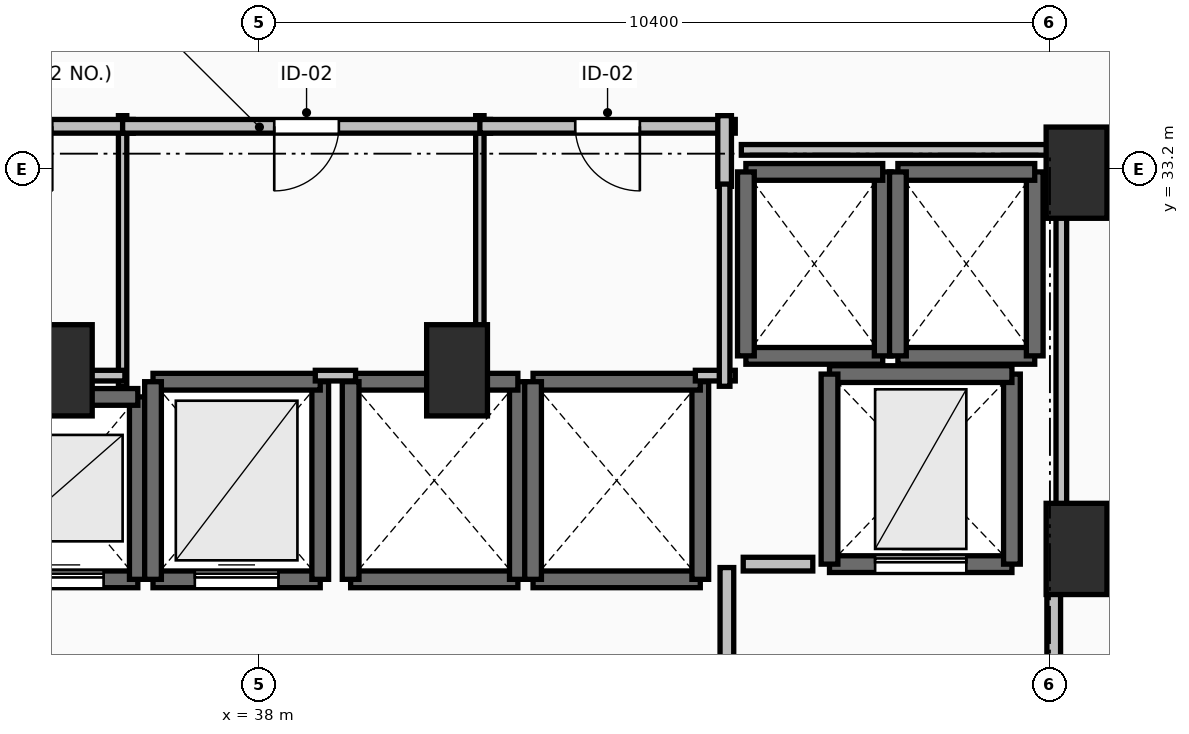
"""IFC4 building model, lengths in metres.
Left out: names, types, materials, properties, quantities, classifications, styles, units other than length and angle.
Written with IfcOpenShell. Run it as: python <this file> out.ifc"""

import sys

from ifc_helpers import new_model, si_unit, direction, frame, frame_2d, origin, origin_2d, place, context, subcontext, project, spatial, rectangle, extrude, element, fill, save


model = new_model("IFC4")
c1 = context("Model", 3, precision=1e-05, world=origin(), true_north=direction((0.0, 1.0)))
c2 = subcontext(c1, "Body", "Model", "MODEL_VIEW")
j1 = project(units=[si_unit("LENGTHUNIT", "METRE"), si_unit("PLANEANGLEUNIT", "RADIAN")], contexts=[c1])
p1 = place(None, origin())
s1 = spatial("IfcSite", under=j1, at=p1, CompositionType="ELEMENT")
p2 = place(p1, origin())
s2 = spatial("IfcBuilding", under=s1, at=p2, CompositionType="ELEMENT")
p3 = place(p2, frame((0.0, 0.0, 55.5)))
s3 = spatial("IfcBuildingStorey", under=s2, at=p3, CompositionType="ELEMENT", Elevation=55.5)
for number, where, z_axis, x_axis in (
    (1, (48.75, 33.15, 0.0), (0.0, 0.0, 1.0), (1.0, 0.0, 0.0)),
    (2, (48.75, 28.2, 0.0), (0.0, 0.0, 1.0), (1.0, 0.0, 0.0)),
    (3, (35.4, 30.55, 0.0), (0.0, 0.0, 1.0), (1.0, 0.0, 0.0)),
    (4, (40.6, 30.55, 0.0), (0.0, 0.0, 1.0), (1.0, 0.0, 0.0)),
):
    element("IfcColumn", number, at=place(p3, frame(where, z_axis=z_axis, x_axis=x_axis)), inside=s3, PredefinedType="PILASTER", context=c2, shape_type="SweptSolid", body=[
        extrude(rectangle(XDim=0.8, YDim=1.2, at=origin_2d()), origin(), (0.0, 0.0, 1.0), 3.5),
    ])
p4 = place(p3, frame((34.4, 27.8, 0.0), z_axis=(0.0, 0.0, 1.0), x_axis=(1.0, 0.0, 0.0)))
e5 = element("IfcWall", 5, at=p4, inside=s3, PredefinedType="SOLIDWALL", context=c2, shape_type="SweptSolid", body=[
    extrude(rectangle(XDim=2.0, YDim=0.22, at=frame_2d((1.0, 0.0))), origin(), (0.0, 0.0, 1.0), 3.24),
])
p5 = place(p4, frame((0.45, 0.0, 0.0)))
e6 = element("IfcOpeningElement", 6, at=p5, cuts=e5, PredefinedType="OPENING", context=c2, shape_type="SweptSolid", body=[
    extrude(rectangle(XDim=1.1, YDim=2.2, at=frame_2d((0.55, 1.1))), frame((0.0, 0.125, 0.0), z_axis=(0.0, -1.0, 0.0), x_axis=(1.0, 0.0, 0.0)), (0.0, 0.0, 1.0), 0.25),
])
p6 = place(p3, frame((36.4, 27.8, 0.0), z_axis=(0.0, 0.0, 1.0), x_axis=(0.0, 1.0, 0.0)))
e7 = element("IfcWall", 7, at=p6, inside=s3, PredefinedType="SOLIDWALL", context=c2, shape_type="SweptSolid", body=[
    extrude(rectangle(XDim=2.4, YDim=0.22, at=frame_2d((1.2, 0.0))), origin(), (0.0, 0.0, 1.0), 3.24),
])
p7 = place(p3, frame((36.4, 30.2, 0.0), z_axis=(0.0, 0.0, 1.0), x_axis=(-1.0, 0.0, 0.0)))
e8 = element("IfcWall", 8, at=p7, inside=s3, PredefinedType="SOLIDWALL", context=c2, shape_type="SweptSolid", body=[
    extrude(rectangle(XDim=2.0, YDim=0.22, at=frame_2d((1.0, 0.0))), origin(), (0.0, 0.0, 1.0), 3.24),
])
p8 = place(p3, frame((36.6, 27.8, 0.0), z_axis=(0.0, 0.0, 1.0), x_axis=(1.0, 0.0, 0.0)))
e9 = element("IfcWall", 9, at=p8, inside=s3, PredefinedType="SOLIDWALL", context=c2, shape_type="SweptSolid", body=[
    extrude(rectangle(XDim=2.2, YDim=0.22, at=frame_2d((1.1, 0.0))), origin(), (0.0, 0.0, 1.0), 3.24),
])
p9 = place(p8, frame((0.55, 0.0, 0.0)))
e10 = element("IfcOpeningElement", 10, at=p9, cuts=e9, PredefinedType="OPENING", context=c2, shape_type="SweptSolid", body=[
    extrude(rectangle(XDim=1.1, YDim=2.2, at=frame_2d((0.55, 1.1))), frame((0.0, 0.125, 0.0), z_axis=(0.0, -1.0, 0.0), x_axis=(1.0, 0.0, 0.0)), (0.0, 0.0, 1.0), 0.25),
])
p10 = place(p3, frame((38.8, 27.8, 0.0), z_axis=(0.0, 0.0, 1.0), x_axis=(0.0, 1.0, 0.0)))
e11 = element("IfcWall", 11, at=p10, inside=s3, PredefinedType="SOLIDWALL", context=c2, shape_type="SweptSolid", body=[
    extrude(rectangle(XDim=2.6, YDim=0.22, at=frame_2d((1.3, 0.0))), origin(), (0.0, 0.0, 1.0), 3.24),
])
p11 = place(p3, frame((38.8, 30.4, 0.0), z_axis=(0.0, 0.0, 1.0), x_axis=(-1.0, 0.0, 0.0)))
e12 = element("IfcWall", 12, at=p11, inside=s3, PredefinedType="SOLIDWALL", context=c2, shape_type="SweptSolid", body=[
    extrude(rectangle(XDim=2.2, YDim=0.22, at=frame_2d((1.1, 0.0))), origin(), (0.0, 0.0, 1.0), 3.24),
])
p12 = place(p3, frame((36.6, 30.4, 0.0), z_axis=(0.0, 0.0, 1.0), x_axis=(0.0, -1.0, 0.0)))
e13 = element("IfcWall", 13, at=p12, inside=s3, PredefinedType="SOLIDWALL", context=c2, shape_type="SweptSolid", body=[
    extrude(rectangle(XDim=2.6, YDim=0.22, at=frame_2d((1.3, 0.0))), origin(), (0.0, 0.0, 1.0), 3.24),
])
p13 = place(p3, frame((39.2, 27.8, 0.0), z_axis=(0.0, 0.0, 1.0), x_axis=(1.0, 0.0, 0.0)))
e14 = element("IfcWall", 14, at=p13, inside=s3, PredefinedType="SOLIDWALL", context=c2, shape_type="SweptSolid", body=[
    extrude(rectangle(XDim=2.2, YDim=0.22, at=frame_2d((1.1, 0.0))), origin(), (0.0, 0.0, 1.0), 3.24),
])
p14 = place(p3, frame((41.4, 27.8, 0.0), z_axis=(0.0, 0.0, 1.0), x_axis=(0.0, 1.0, 0.0)))
e15 = element("IfcWall", 15, at=p14, inside=s3, PredefinedType="SOLIDWALL", context=c2, shape_type="SweptSolid", body=[
    extrude(rectangle(XDim=2.6, YDim=0.22, at=frame_2d((1.3, 0.0))), origin(), (0.0, 0.0, 1.0), 3.24),
])
p15 = place(p3, frame((41.4, 30.4, 0.0), z_axis=(0.0, 0.0, 1.0), x_axis=(-1.0, 0.0, 0.0)))
e16 = element("IfcWall", 16, at=p15, inside=s3, PredefinedType="SOLIDWALL", context=c2, shape_type="SweptSolid", body=[
    extrude(rectangle(XDim=2.2, YDim=0.22, at=frame_2d((1.1, 0.0))), origin(), (0.0, 0.0, 1.0), 3.24),
])
p16 = place(p3, frame((39.2, 30.4, 0.0), z_axis=(0.0, 0.0, 1.0), x_axis=(0.0, -1.0, 0.0)))
e17 = element("IfcWall", 17, at=p16, inside=s3, PredefinedType="SOLIDWALL", context=c2, shape_type="SweptSolid", body=[
    extrude(rectangle(XDim=2.6, YDim=0.22, at=frame_2d((1.3, 0.0))), origin(), (0.0, 0.0, 1.0), 3.24),
])
p17 = place(p3, frame((41.6, 27.8, 0.0), z_axis=(0.0, 0.0, 1.0), x_axis=(1.0, 0.0, 0.0)))
e18 = element("IfcWall", 18, at=p17, inside=s3, PredefinedType="SOLIDWALL", context=c2, shape_type="SweptSolid", body=[
    extrude(rectangle(XDim=2.2, YDim=0.22, at=frame_2d((1.1, 0.0))), origin(), (0.0, 0.0, 1.0), 3.24),
])
p18 = place(p3, frame((43.8, 27.8, 0.0), z_axis=(0.0, 0.0, 1.0), x_axis=(0.0, 1.0, 0.0)))
e19 = element("IfcWall", 19, at=p18, inside=s3, PredefinedType="SOLIDWALL", context=c2, shape_type="SweptSolid", body=[
    extrude(rectangle(XDim=2.6, YDim=0.22, at=frame_2d((1.3, 0.0))), origin(), (0.0, 0.0, 1.0), 3.24),
])
p19 = place(p3, frame((43.8, 30.4, 0.0), z_axis=(0.0, 0.0, 1.0), x_axis=(-1.0, 0.0, 0.0)))
e20 = element("IfcWall", 20, at=p19, inside=s3, PredefinedType="SOLIDWALL", context=c2, shape_type="SweptSolid", body=[
    extrude(rectangle(XDim=2.2, YDim=0.22, at=frame_2d((1.1, 0.0))), origin(), (0.0, 0.0, 1.0), 3.24),
])
p20 = place(p3, frame((41.6, 30.4, 0.0), z_axis=(0.0, 0.0, 1.0), x_axis=(0.0, -1.0, 0.0)))
e21 = element("IfcWall", 21, at=p20, inside=s3, PredefinedType="SOLIDWALL", context=c2, shape_type="SweptSolid", body=[
    extrude(rectangle(XDim=2.6, YDim=0.22, at=frame_2d((1.3, 0.0))), origin(), (0.0, 0.0, 1.0), 3.24),
])
p21 = place(p3, frame((44.4, 30.74, 0.0), z_axis=(0.0, 0.0, 1.0), x_axis=(1.0, 0.0, 0.0)))
e22 = element("IfcWall", 22, at=p21, inside=s3, PredefinedType="SOLIDWALL", context=c2, shape_type="SweptSolid", body=[
    extrude(rectangle(XDim=1.8, YDim=0.22, at=frame_2d((0.9, 0.0))), origin(), (0.0, 0.0, 1.0), 3.24),
])
p22 = place(p3, frame((46.2, 30.74, 0.0), z_axis=(0.0, 0.0, 1.0), x_axis=(0.0, 1.0, 0.0)))
e23 = element("IfcWall", 23, at=p22, inside=s3, PredefinedType="SOLIDWALL", context=c2, shape_type="SweptSolid", body=[
    extrude(rectangle(XDim=2.42, YDim=0.22, at=frame_2d((1.21, 0.0))), origin(), (0.0, 0.0, 1.0), 3.24),
])
p23 = place(p3, frame((46.2, 33.16, 0.0), z_axis=(0.0, 0.0, 1.0), x_axis=(-1.0, 0.0, 0.0)))
e24 = element("IfcWall", 24, at=p23, inside=s3, PredefinedType="SOLIDWALL", context=c2, shape_type="SweptSolid", body=[
    extrude(rectangle(XDim=1.8, YDim=0.22, at=frame_2d((0.9, 0.0))), origin(), (0.0, 0.0, 1.0), 3.24),
])
p24 = place(p3, frame((44.4, 33.16, 0.0), z_axis=(0.0, 0.0, 1.0), x_axis=(0.0, -1.0, 0.0)))
e25 = element("IfcWall", 25, at=p24, inside=s3, PredefinedType="SOLIDWALL", context=c2, shape_type="SweptSolid", body=[
    extrude(rectangle(XDim=2.42, YDim=0.22, at=frame_2d((1.21, 0.0))), origin(), (0.0, 0.0, 1.0), 3.24),
])
p25 = place(p3, frame((46.4, 30.74, 0.0), z_axis=(0.0, 0.0, 1.0), x_axis=(1.0, 0.0, 0.0)))
e26 = element("IfcWall", 26, at=p25, inside=s3, PredefinedType="SOLIDWALL", context=c2, shape_type="SweptSolid", body=[
    extrude(rectangle(XDim=1.8, YDim=0.22, at=frame_2d((0.9, 0.0))), origin(), (0.0, 0.0, 1.0), 3.24),
])
p26 = place(p3, frame((48.2, 30.74, 0.0), z_axis=(0.0, 0.0, 1.0), x_axis=(0.0, 1.0, 0.0)))
e27 = element("IfcWall", 27, at=p26, inside=s3, PredefinedType="SOLIDWALL", context=c2, shape_type="SweptSolid", body=[
    extrude(rectangle(XDim=2.42, YDim=0.22, at=frame_2d((1.21, 0.0))), origin(), (0.0, 0.0, 1.0), 3.24),
])
p27 = place(p3, frame((48.2, 33.16, 0.0), z_axis=(0.0, 0.0, 1.0), x_axis=(-1.0, 0.0, 0.0)))
e28 = element("IfcWall", 28, at=p27, inside=s3, PredefinedType="SOLIDWALL", context=c2, shape_type="SweptSolid", body=[
    extrude(rectangle(XDim=1.8, YDim=0.22, at=frame_2d((0.9, 0.0))), origin(), (0.0, 0.0, 1.0), 3.24),
])
p28 = place(p3, frame((46.4, 33.16, 0.0), z_axis=(0.0, 0.0, 1.0), x_axis=(0.0, -1.0, 0.0)))
e29 = element("IfcWall", 29, at=p28, inside=s3, PredefinedType="SOLIDWALL", context=c2, shape_type="SweptSolid", body=[
    extrude(rectangle(XDim=2.42, YDim=0.22, at=frame_2d((1.21, 0.0))), origin(), (0.0, 0.0, 1.0), 3.24),
])
p29 = place(p3, frame((45.5, 28.0, 0.0), z_axis=(0.0, 0.0, 1.0), x_axis=(1.0, 0.0, 0.0)))
e30 = element("IfcWall", 30, at=p29, inside=s3, PredefinedType="SHEAR", context=c2, shape_type="SweptSolid", body=[
    extrude(rectangle(XDim=2.4, YDim=0.22, at=frame_2d((1.2, 0.0))), origin(), (0.0, 0.0, 1.0), 3.24),
])
p30 = place(p29, frame((0.6, 0.0, 0.0)))
e31 = element("IfcOpeningElement", 31, at=p30, cuts=e30, PredefinedType="OPENING", context=c2, shape_type="SweptSolid", body=[
    extrude(rectangle(XDim=1.2, YDim=2.2, at=frame_2d((0.6, 1.1))), frame((0.0, 0.125, 0.0), z_axis=(0.0, -1.0, 0.0), x_axis=(1.0, 0.0, 0.0)), (0.0, 0.0, 1.0), 0.25),
])
p31 = place(p3, frame((47.9, 28.0, 0.0), z_axis=(0.0, 0.0, 1.0), x_axis=(0.0, 1.0, 0.0)))
e32 = element("IfcWall", 32, at=p31, inside=s3, PredefinedType="SHEAR", context=c2, shape_type="SweptSolid", body=[
    extrude(rectangle(XDim=2.5, YDim=0.22, at=frame_2d((1.25, 0.0))), origin(), (0.0, 0.0, 1.0), 3.24),
])
p32 = place(p3, frame((47.9, 30.5, 0.0), z_axis=(0.0, 0.0, 1.0), x_axis=(-1.0, 0.0, 0.0)))
e33 = element("IfcWall", 33, at=p32, inside=s3, PredefinedType="SHEAR", context=c2, shape_type="SweptSolid", body=[
    extrude(rectangle(XDim=2.4, YDim=0.22, at=frame_2d((1.2, 0.0))), origin(), (0.0, 0.0, 1.0), 3.24),
])
p33 = place(p3, frame((45.5, 30.5, 0.0), z_axis=(0.0, 0.0, 1.0), x_axis=(0.0, -1.0, 0.0)))
e34 = element("IfcWall", 34, at=p33, inside=s3, PredefinedType="SHEAR", context=c2, shape_type="SweptSolid", body=[
    extrude(rectangle(XDim=2.5, YDim=0.22, at=frame_2d((1.25, 0.0))), origin(), (0.0, 0.0, 1.0), 3.24),
])
p34 = place(p3, frame((44.15, 27.955, 0.0), z_axis=(0.0, 0.0, 1.0), x_axis=(0.0, -1.0, 0.0)))
e35 = element("IfcWall", 35, at=p34, inside=s3, PredefinedType="PARTITIONING", context=c2, shape_type="SweptSolid", body=[
    extrude(rectangle(XDim=3.91, YDim=0.18, at=frame_2d((1.955, 0.0))), origin(), (0.0, 0.0, 1.0), 3.24),
])
p35 = place(p34, frame((1.355, 0.0, 0.0)))
e36 = element("IfcOpeningElement", 36, at=p35, cuts=e35, PredefinedType="OPENING", context=c2, shape_type="SweptSolid", body=[
    extrude(rectangle(XDim=1.2, YDim=2.15, at=frame_2d((0.6, 1.075))), frame((0.0, 0.105, 0.0), z_axis=(0.0, -1.0, 0.0), x_axis=(1.0, 0.0, 0.0)), (0.0, 0.0, 1.0), 0.21),
])
p36 = place(p3, frame((48.45, 23.95, 0.0), z_axis=(0.0, 0.0, 1.0), x_axis=(0.0, 1.0, 0.0)))
e37 = element("IfcWall", 37, at=p36, inside=s3, PredefinedType="PARTITIONING", context=c2, shape_type="SweptSolid", body=[
    extrude(rectangle(XDim=4.05, YDim=0.18, at=frame_2d((2.025, 0.0))), origin(), (0.0, 0.0, 1.0), 3.24),
])
p37 = place(p36, frame((1.425, 0.0, 0.0)))
e38 = element("IfcOpeningElement", 38, at=p37, cuts=e37, PredefinedType="OPENING", context=c2, shape_type="SweptSolid", body=[
    extrude(rectangle(XDim=1.2, YDim=2.15, at=frame_2d((0.6, 1.075))), frame((0.0, 0.105, 0.0), z_axis=(0.0, -1.0, 0.0), x_axis=(1.0, 0.0, 0.0)), (0.0, 0.0, 1.0), 0.21),
])
p38 = place(p3, frame((36.2, 30.34, 0.0), z_axis=(0.0, 0.0, 1.0), x_axis=(0.0, 1.0, 0.0)))
e39 = element("IfcWall", 39, at=p38, inside=s3, PredefinedType="PARTITIONING", context=c2, shape_type="SweptSolid", body=[
    extrude(rectangle(XDim=3.56, YDim=0.11, at=frame_2d((1.78, 0.0))), origin(), (0.0, 0.0, 1.0), 2.432),
])
p39 = place(p3, frame((36.34, 33.76, 0.0), z_axis=(0.0, 0.0, 1.0), x_axis=(-1.0, 0.0, 0.0)))
e40 = element("IfcWall", 40, at=p39, inside=s3, PredefinedType="PARTITIONING", context=c2, shape_type="SweptSolid", body=[
    extrude(rectangle(XDim=2.98, YDim=0.18, at=frame_2d((1.49, 0.0))), origin(), (0.0, 0.0, 1.0), 3.24),
])
p40 = place(p39, frame((1.065, 0.0, 0.0)))
e41 = element("IfcOpeningElement", 41, at=p40, cuts=e40, PredefinedType="OPENING", context=c2, shape_type="SweptSolid", body=[
    extrude(rectangle(XDim=0.85, YDim=2.1, at=frame_2d((0.425, 1.05))), frame((0.0, 0.105, 0.0), z_axis=(0.0, -1.0, 0.0), x_axis=(1.0, 0.0, 0.0)), (0.0, 0.0, 1.0), 0.21),
])
p41 = place(p3, frame((40.9, 30.34, 0.0), z_axis=(0.0, 0.0, 1.0), x_axis=(0.0, 1.0, 0.0)))
e42 = element("IfcWall", 42, at=p41, inside=s3, PredefinedType="PARTITIONING", context=c2, shape_type="SweptSolid", body=[
    extrude(rectangle(XDim=3.56, YDim=0.11, at=frame_2d((1.78, 0.0))), origin(), (0.0, 0.0, 1.0), 3.24),
])
p42 = place(p3, frame((41.04, 33.76, 0.0), z_axis=(0.0, 0.0, 1.0), x_axis=(-1.0, 0.0, 0.0)))
e43 = element("IfcWall", 43, at=p42, inside=s3, PredefinedType="PARTITIONING", context=c2, shape_type="SweptSolid", body=[
    extrude(rectangle(XDim=4.84, YDim=0.18, at=frame_2d((2.42, 0.0))), origin(), (0.0, 0.0, 1.0), 3.24),
])
p43 = place(p42, frame((1.995, 0.0, 0.0)))
e44 = element("IfcOpeningElement", 44, at=p43, cuts=e43, PredefinedType="OPENING", context=c2, shape_type="SweptSolid", body=[
    extrude(rectangle(XDim=0.85, YDim=2.1, at=frame_2d((0.425, 1.05))), frame((0.0, 0.105, 0.0), z_axis=(0.0, -1.0, 0.0), x_axis=(1.0, 0.0, 0.0)), (0.0, 0.0, 1.0), 0.21),
])
p44 = place(p3, frame((44.26, 33.76, 0.0), z_axis=(0.0, 0.0, 1.0), x_axis=(-1.0, 0.0, 0.0)))
e45 = element("IfcWall", 45, at=p44, inside=s3, PredefinedType="PARTITIONING", context=c2, shape_type="SweptSolid", body=[
    extrude(rectangle(XDim=3.36, YDim=0.18, at=frame_2d((1.68, 0.0))), origin(), (0.0, 0.0, 1.0), 3.24),
])
p45 = place(p44, frame((1.255, 0.0, 0.0)))
e46 = element("IfcOpeningElement", 46, at=p45, cuts=e45, PredefinedType="OPENING", context=c2, shape_type="SweptSolid", body=[
    extrude(rectangle(XDim=0.85, YDim=2.1, at=frame_2d((0.425, 1.05))), frame((0.0, 0.105, 0.0), z_axis=(0.0, -1.0, 0.0), x_axis=(1.0, 0.0, 0.0)), (0.0, 0.0, 1.0), 0.21),
])
p46 = place(p3, frame((44.12, 32.97, 0.0), z_axis=(0.0, 0.0, 1.0), x_axis=(0.0, 1.0, 0.0)))
e47 = element("IfcWall", 47, at=p46, inside=s3, PredefinedType="PARTITIONING", context=c2, shape_type="SweptSolid", body=[
    extrude(rectangle(XDim=0.93, YDim=0.18, at=frame_2d((0.465, 0.0))), origin(), (0.0, 0.0, 1.0), 3.24),
])
p47 = place(p3, frame((45.28, 28.0, 0.0), z_axis=(0.0, 0.0, 1.0), x_axis=(-1.0, 0.0, 0.0)))
e48 = element("IfcWall", 48, at=p47, inside=s3, PredefinedType="PARTITIONING", context=c2, shape_type="SweptSolid", body=[
    extrude(rectangle(XDim=0.915, YDim=0.18, at=frame_2d((0.458, 0.0))), origin(), (0.0, 0.0, 1.0), 3.24),
])
p48 = place(p3, frame((33.44, 30.48, 0.0), z_axis=(0.0, 0.0, 1.0), x_axis=(1.0, 0.0, 0.0)))
e49 = element("IfcWall", 49, at=p48, inside=s3, PredefinedType="PARTITIONING", context=c2, shape_type="SweptSolid", body=[
    extrude(rectangle(XDim=2.79, YDim=0.14, at=frame_2d((1.395, 0.0))), origin(), (0.0, 0.0, 1.0), 2.432),
])
p49 = place(p3, frame((38.735, 30.48, 0.0), z_axis=(0.0, 0.0, 1.0), x_axis=(1.0, 0.0, 0.0)))
e50 = element("IfcWall", 50, at=p49, inside=s3, PredefinedType="PARTITIONING", context=c2, shape_type="SweptSolid", body=[
    extrude(rectangle(XDim=0.53, YDim=0.14, at=frame_2d((0.265, 0.0))), origin(), (0.0, 0.0, 1.0), 2.432),
])
p50 = place(p3, frame((43.735, 30.48, 0.0), z_axis=(0.0, 0.0, 1.0), x_axis=(1.0, 0.0, 0.0)))
e51 = element("IfcWall", 51, at=p50, inside=s3, PredefinedType="PARTITIONING", context=c2, shape_type="SweptSolid", body=[
    extrude(rectangle(XDim=0.525, YDim=0.14, at=frame_2d((0.262, 0.0))), origin(), (0.0, 0.0, 1.0), 3.24),
])
p51 = place(p3, frame((44.12, 30.34, 0.0), z_axis=(0.0, 0.0, 1.0), x_axis=(0.0, 1.0, 0.0)))
e52 = element("IfcWall", 52, at=p51, inside=s3, PredefinedType="PARTITIONING", context=c2, shape_type="SweptSolid", body=[
    extrude(rectangle(XDim=2.66, YDim=0.14, at=frame_2d((1.33, 0.0))), origin(), (0.0, 0.0, 1.0), 3.24),
])
p52 = place(p3, frame((44.34, 33.45, 0.0), z_axis=(0.0, 0.0, 1.0), x_axis=(1.0, 0.0, 0.0)))
e53 = element("IfcWall", 53, at=p52, inside=s3, PredefinedType="PARTITIONING", context=c2, shape_type="SweptSolid", body=[
    extrude(rectangle(XDim=4.21, YDim=0.14, at=frame_2d((2.105, 0.0))), origin(), (0.0, 0.0, 1.0), 2.432),
])
p53 = place(p3, frame((48.55, 33.45, 0.0), z_axis=(0.0, 0.0, 1.0), x_axis=(0.0, -1.0, 0.0)))
e54 = element("IfcWall", 54, at=p53, inside=s3, PredefinedType="PARTITIONING", context=c2, shape_type="SweptSolid", body=[
    extrude(rectangle(XDim=5.254, YDim=0.14, at=frame_2d((2.627, 0.0))), origin(), (0.0, 0.0, 1.0), 2.432),
])
p54 = place(p5, origin())
e55 = element("IfcDoor", 55, at=p54, inside=s3, OperationType="SLIDING_TO_LEFT", PredefinedType="DOOR", context=c2, shape_type="SweptSolid", body=[
    extrude(rectangle(XDim=1.1, YDim=2.2, at=frame_2d((0.55, 1.1))), frame((0.0, 0.025, 0.0), z_axis=(0.0, -1.0, 0.0), x_axis=(1.0, 0.0, 0.0)), (0.0, 0.0, 1.0), 0.05),
])
fill(e6, e55)
p55 = place(p9, origin())
e56 = element("IfcDoor", 56, at=p55, inside=s3, OperationType="SLIDING_TO_LEFT", PredefinedType="DOOR", context=c2, shape_type="SweptSolid", body=[
    extrude(rectangle(XDim=1.1, YDim=2.2, at=frame_2d((0.55, 1.1))), frame((0.0, 0.025, 0.0), z_axis=(0.0, -1.0, 0.0), x_axis=(1.0, 0.0, 0.0)), (0.0, 0.0, 1.0), 0.05),
])
fill(e10, e56)
p56 = place(p30, origin())
e57 = element("IfcDoor", 57, at=p56, inside=s3, OperationType="SLIDING_TO_LEFT", PredefinedType="DOOR", context=c2, shape_type="SweptSolid", body=[
    extrude(rectangle(XDim=1.2, YDim=2.2, at=frame_2d((0.6, 1.1))), frame((0.0, 0.025, 0.0), z_axis=(0.0, -1.0, 0.0), x_axis=(1.0, 0.0, 0.0)), (0.0, 0.0, 1.0), 0.05),
])
fill(e31, e57)
p57 = place(p40, origin())
e58 = element("IfcDoor", 58, at=p57, inside=s3, OperationType="SINGLE_SWING_LEFT", PredefinedType="DOOR", context=c2, shape_type="SweptSolid", body=[
    extrude(rectangle(XDim=0.85, YDim=2.1, at=frame_2d((0.425, 1.05))), frame((0.0, 0.025, 0.0), z_axis=(0.0, -1.0, 0.0), x_axis=(1.0, 0.0, 0.0)), (0.0, 0.0, 1.0), 0.05),
])
fill(e41, e58)
p58 = place(p43, origin())
e59 = element("IfcDoor", 59, at=p58, inside=s3, OperationType="SINGLE_SWING_RIGHT", PredefinedType="DOOR", context=c2, shape_type="SweptSolid", body=[
    extrude(rectangle(XDim=0.85, YDim=2.1, at=frame_2d((0.425, 1.05))), frame((0.0, 0.025, 0.0), z_axis=(0.0, -1.0, 0.0), x_axis=(1.0, 0.0, 0.0)), (0.0, 0.0, 1.0), 0.05),
])
fill(e44, e59)
p59 = place(p45, origin())
e60 = element("IfcDoor", 60, at=p59, inside=s3, OperationType="SINGLE_SWING_LEFT", PredefinedType="DOOR", context=c2, shape_type="SweptSolid", body=[
    extrude(rectangle(XDim=0.85, YDim=2.1, at=frame_2d((0.425, 1.05))), frame((0.0, 0.025, 0.0), z_axis=(0.0, -1.0, 0.0), x_axis=(1.0, 0.0, 0.0)), (0.0, 0.0, 1.0), 0.05),
])
fill(e46, e60)
save(model, sys.argv[1])
